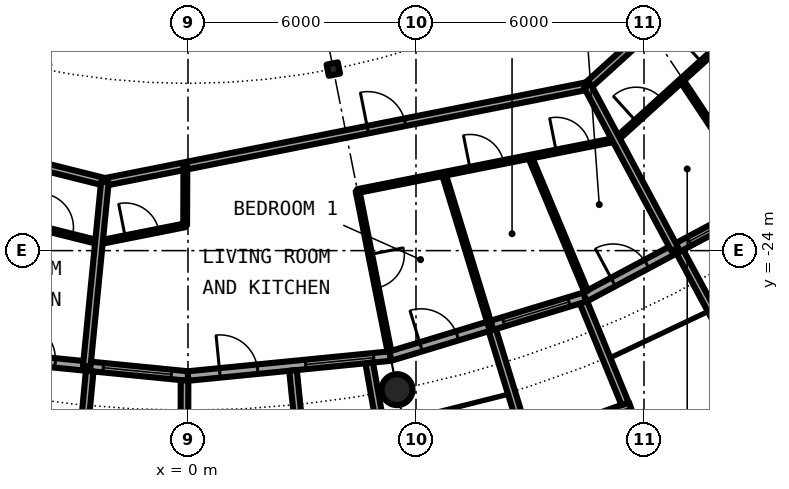
"""IFC4 building model, lengths in metres.
Left out: names, types, materials, properties, quantities, classifications, styles, units other than length and angle.
Written with IfcOpenShell. Run it as: python <this file> out.ifc"""

import sys

from ifc_helpers import new_model, si_unit, direction, frame, frame_2d, origin, origin_2d, place, context, subcontext, project, spatial, rectangle, circle, hollow_circle, i_section, extrude, element, fill, save


model = new_model("IFC4")
c1 = context("Model", 3, precision=1e-05, world=origin(), true_north=direction((0.0, 1.0)))
c2 = subcontext(c1, "Body", "Model", "MODEL_VIEW")
j1 = project(units=[si_unit("LENGTHUNIT", "METRE"), si_unit("PLANEANGLEUNIT", "RADIAN")], contexts=[c1])
p1 = place(None, origin())
s1 = spatial("IfcSite", under=j1, at=p1, CompositionType="ELEMENT")
p2 = place(p1, origin())
s2 = spatial("IfcBuilding", under=s1, at=p2, CompositionType="ELEMENT")
p3 = place(p2, frame((0.0, 0.0, 227.95)))
s3 = spatial("IfcBuildingStorey", under=s2, at=p3, CompositionType="ELEMENT", Elevation=227.95)
p4 = place(p3, frame((5.501, -27.658, 0.0), z_axis=(0.0, 0.0, 1.0), x_axis=(1.0, 0.0, 0.0)))
e1 = element("IfcColumn", 1, at=p4, inside=s3, PredefinedType="COLUMN", context=c2, shape_type="SweptSolid", body=[
    extrude(hollow_circle(Radius=0.406, WallThickness=0.03, at=origin_2d()), origin(), (0.0, 0.0, 1.0), 3.05),
])
p5 = place(p3, frame((3.824, -19.223, 0.0), z_axis=(0.0, 0.0, 1.0), x_axis=(0.195090322016, -0.980785280403, 0.0)))
e2 = element("IfcColumn", 2, at=p5, inside=s3, PredefinedType="COLUMN", context=c2, shape_type="SweptSolid", body=[
    extrude(i_section(OverallWidth=0.3, OverallDepth=0.3, WebThickness=0.011, FlangeThickness=0.019, FilletRadius=0.027, at=origin_2d()), origin(), (0.0, 0.0, 1.0), 3.05),
])
p6 = place(p3, frame((-5.326, -26.775, 0.0), z_axis=(0.0, 0.0, 1.0), x_axis=(0.995173996315, -0.098126026407, 0.0)))
e3 = element("IfcWall", 3, at=p6, inside=s3, PredefinedType="SOLIDWALL", context=c2, shape_type="SweptSolid", body=[
    extrude(rectangle(XDim=5.352, YDim=0.25, at=frame_2d((2.676, 0.0))), origin(), (0.0, 0.0, 1.0), 2.7),
])
p7 = place(p6, frame((0.841, 0.0, 0.0)))
e4 = element("IfcOpeningElement", 4, at=p7, cuts=e3, PredefinedType="OPENING", context=c2, shape_type="SweptSolid", body=[
    extrude(rectangle(XDim=1.0, YDim=2.2, at=frame_2d((0.5, 1.1))), frame((0.0, 0.135, 0.0), z_axis=(0.0, -1.0, 0.0), x_axis=(1.0, 0.0, 0.0)), (0.0, 0.0, 1.0), 0.27),
])
p8 = place(p6, frame((3.111, 0.0, 0.3)))
e5 = element("IfcOpeningElement", 5, at=p8, cuts=e3, PredefinedType="OPENING", context=c2, shape_type="SweptSolid", body=[
    extrude(rectangle(XDim=1.8, YDim=2.1, at=frame_2d((0.9, 1.05))), frame((0.0, 0.135, 0.0), z_axis=(0.0, -1.0, 0.0), x_axis=(1.0, 0.0, 0.0)), (0.0, 0.0, 1.0), 0.27),
])
p9 = place(p3, frame((-2.586, -27.171, -0.03), z_axis=(0.0, 0.0, 1.0), x_axis=(-0.094548432284, -0.995520262954, 0.0)))
e6 = element("IfcWall", 6, at=p9, inside=s3, PredefinedType="SOLIDWALL", context=c2, shape_type="SweptSolid", body=[
    extrude(rectangle(XDim=3.006, YDim=0.2, at=frame_2d((1.503, 0.0))), origin(), (0.0, 0.0, 1.0), 2.73),
])
p10 = place(p3, frame((-0.09, -27.417, -0.03), z_axis=(0.0, 0.0, 1.0), x_axis=(-0.00347308367, -0.999993968827, 0.0)))
e7 = element("IfcWall", 7, at=p10, inside=s3, PredefinedType="SOLIDWALL", context=c2, shape_type="SweptSolid", body=[
    extrude(rectangle(XDim=2.882, YDim=0.2, at=frame_2d((1.441, 0.0))), origin(), (0.0, 0.0, 1.0), 2.73),
])
p11 = place(p3, frame((0.0, -27.3, 0.0), z_axis=(0.0, 0.0, 1.0), x_axis=(0.995173996315, 0.098126026407, 0.0)))
e8 = element("IfcWall", 8, at=p11, inside=s3, PredefinedType="SOLIDWALL", context=c2, shape_type="SweptSolid", body=[
    extrude(rectangle(XDim=5.352, YDim=0.25, at=frame_2d((2.676, 0.0))), origin(), (0.0, 0.0, 1.0), 2.7),
])
p12 = place(p11, frame((0.841, 0.0, 0.0)))
e9 = element("IfcOpeningElement", 9, at=p12, cuts=e8, PredefinedType="OPENING", context=c2, shape_type="SweptSolid", body=[
    extrude(rectangle(XDim=1.0, YDim=2.2, at=frame_2d((0.5, 1.1))), frame((0.0, 0.135, 0.0), z_axis=(0.0, -1.0, 0.0), x_axis=(1.0, 0.0, 0.0)), (0.0, 0.0, 1.0), 0.27),
])
p13 = place(p11, frame((3.111, 0.0, 0.3)))
e10 = element("IfcOpeningElement", 10, at=p13, cuts=e8, PredefinedType="OPENING", context=c2, shape_type="SweptSolid", body=[
    extrude(rectangle(XDim=1.8, YDim=2.1, at=frame_2d((0.9, 1.05))), frame((0.0, 0.135, 0.0), z_axis=(0.0, -1.0, 0.0), x_axis=(1.0, 0.0, 0.0)), (0.0, 0.0, 1.0), 0.27),
])
p14 = place(p3, frame((2.764, -27.153, -0.03), z_axis=(0.0, 0.0, 1.0), x_axis=(0.101505487237, -0.994834979311, 0.0)))
e11 = element("IfcWall", 11, at=p14, inside=s3, PredefinedType="SOLIDWALL", context=c2, shape_type="SweptSolid", body=[
    extrude(rectangle(XDim=3.007, YDim=0.2, at=frame_2d((1.503, 0.0))), origin(), (0.0, 0.0, 1.0), 2.73),
])
p15 = place(p3, frame((4.769, -26.956, -0.03), z_axis=(0.0, 0.0, 1.0), x_axis=(0.174056778901, -0.984735618183, 0.0)))
e12 = element("IfcWall", 12, at=p15, inside=s3, PredefinedType="SOLIDWALL", context=c2, shape_type="SweptSolid", body=[
    extrude(rectangle(XDim=2.925, YDim=0.2, at=frame_2d((1.462, 0.0))), origin(), (0.0, 0.0, 1.0), 2.73),
])
p16 = place(p3, frame((5.326, -26.775, 0.0), z_axis=(0.0, 0.0, 1.0), x_axis=(0.956965678721, 0.290201119486, 0.0)))
e13 = element("IfcWall", 13, at=p16, inside=s3, PredefinedType="SOLIDWALL", context=c2, shape_type="SweptSolid", body=[
    extrude(rectangle(XDim=5.351, YDim=0.25, at=frame_2d((2.676, 0.0))), origin(), (0.0, 0.0, 1.0), 2.7),
])
p17 = place(p16, frame((0.841, 0.0, 0.0)))
e14 = element("IfcOpeningElement", 14, at=p17, cuts=e13, PredefinedType="OPENING", context=c2, shape_type="SweptSolid", body=[
    extrude(rectangle(XDim=1.0, YDim=2.2, at=frame_2d((0.5, 1.1))), frame((0.0, 0.135, 0.0), z_axis=(0.0, -1.0, 0.0), x_axis=(1.0, 0.0, 0.0)), (0.0, 0.0, 1.0), 0.27),
])
p18 = place(p16, frame((3.111, 0.0, 0.3)))
e15 = element("IfcOpeningElement", 15, at=p18, cuts=e13, PredefinedType="OPENING", context=c2, shape_type="SweptSolid", body=[
    extrude(rectangle(XDim=1.8, YDim=2.1, at=frame_2d((0.9, 1.05))), frame((0.0, 0.135, 0.0), z_axis=(0.0, -1.0, 0.0), x_axis=(1.0, 0.0, 0.0)), (0.0, 0.0, 1.0), 0.27),
])
p19 = place(p3, frame((8.82, -29.093, -0.03), z_axis=(0.0, 0.0, 1.0), x_axis=(0.941461077774, 0.337121697664, 0.0)))
e16 = element("IfcWall", 16, at=p19, inside=s3, PredefinedType="SOLIDWALL", context=c2, shape_type="SweptSolid", body=[
    extrude(rectangle(XDim=2.993, YDim=0.2, at=frame_2d((1.497, 0.0))), origin(), (0.0, 0.0, 1.0), 2.73),
])
p20 = place(p19, frame((0.457, 0.0, 0.33)))
e17 = element("IfcOpeningElement", 17, at=p20, cuts=e16, PredefinedType="OPENING", context=c2, shape_type="SweptSolid", body=[
    extrude(circle(Radius=1.04, at=frame_2d((1.04, 1.04))), frame((0.0, 0.11, 0.0), z_axis=(0.0, -1.0, 0.0), x_axis=(1.0, 0.0, 0.0)), (0.0, 0.0, 1.0), 0.22),
])
p21 = place(p3, frame((8.009, -26.092, -0.03), z_axis=(0.0, 0.0, 1.0), x_axis=(0.293406695073, -0.955987715029, 0.0)))
e18 = element("IfcWall", 18, at=p21, inside=s3, PredefinedType="SOLIDWALL", context=c2, shape_type="SweptSolid", body=[
    extrude(rectangle(XDim=3.006, YDim=0.2, at=frame_2d((1.503, 0.0))), origin(), (0.0, 0.0, 1.0), 2.73),
])
p22 = place(p3, frame((10.409, -25.364, -0.03), z_axis=(0.0, 0.0, 1.0), x_axis=(0.379509886562, -0.925187681501, 0.0)))
e19 = element("IfcWall", 19, at=p22, inside=s3, PredefinedType="SOLIDWALL", context=c2, shape_type="SweptSolid", body=[
    extrude(rectangle(XDim=2.883, YDim=0.2, at=frame_2d((1.441, 0.0))), origin(), (0.0, 0.0, 1.0), 2.73),
])
p23 = place(p3, frame((10.447, -25.222, 0.0), z_axis=(0.0, 0.0, 1.0), x_axis=(0.881915646801, 0.471407246368, 0.0)))
e20 = element("IfcWall", 20, at=p23, inside=s3, PredefinedType="SOLIDWALL", context=c2, shape_type="SweptSolid", body=[
    extrude(rectangle(XDim=5.352, YDim=0.25, at=frame_2d((2.676, 0.0))), origin(), (0.0, 0.0, 1.0), 2.7),
])
p24 = place(p23, frame((0.841, 0.0, 0.0)))
e21 = element("IfcOpeningElement", 21, at=p24, cuts=e20, PredefinedType="OPENING", context=c2, shape_type="SweptSolid", body=[
    extrude(rectangle(XDim=1.0, YDim=2.2, at=frame_2d((0.5, 1.1))), frame((0.0, 0.135, 0.0), z_axis=(0.0, -1.0, 0.0), x_axis=(1.0, 0.0, 0.0)), (0.0, 0.0, 1.0), 0.27),
])
p25 = place(p23, frame((3.111, 0.0, 0.3)))
e22 = element("IfcOpeningElement", 22, at=p25, cuts=e20, PredefinedType="OPENING", context=c2, shape_type="SweptSolid", body=[
    extrude(rectangle(XDim=1.8, YDim=2.1, at=frame_2d((0.9, 1.05))), frame((0.0, 0.135, 0.0), z_axis=(0.0, -1.0, 0.0), x_axis=(1.0, 0.0, 0.0)), (0.0, 0.0, 1.0), 0.27),
])
p26 = place(p3, frame((12.945, -24.029, -0.03), z_axis=(0.0, 0.0, 1.0), x_axis=(0.474424310775, -0.88029629861, 0.0)))
e23 = element("IfcWall", 23, at=p26, inside=s3, PredefinedType="SOLIDWALL", context=c2, shape_type="SweptSolid", body=[
    extrude(rectangle(XDim=3.006, YDim=0.2, at=frame_2d((1.503, 0.0))), origin(), (0.0, 0.0, 1.0), 2.73),
])
p27 = place(p3, frame((-4.608, -23.218, 0.0), z_axis=(0.0, 0.0, 1.0), x_axis=(0.970124059177, -0.242609376996, 0.0)))
e24 = element("IfcWall", 24, at=p27, inside=s3, PredefinedType="PARTITIONING", context=c2, shape_type="SweptSolid", body=[
    extrude(rectangle(XDim=2.337, YDim=0.1, at=frame_2d((1.168, 0.0))), origin(), (0.0, 0.0, 1.0), 2.7),
])
p28 = place(p27, frame((0.716, 0.0, 0.0)))
e25 = element("IfcOpeningElement", 25, at=p28, cuts=e24, PredefinedType="OPENING", context=c2, shape_type="SweptSolid", body=[
    extrude(rectangle(XDim=0.9, YDim=2.3, at=frame_2d((0.45, 1.15))), frame((0.0, 0.06, 0.0), z_axis=(0.0, -1.0, 0.0), x_axis=(1.0, 0.0, 0.0)), (0.0, 0.0, 1.0), 0.12),
])
p29 = place(p3, frame((11.266, -21.078, 0.0), z_axis=(0.0, 0.0, 1.0), x_axis=(0.74114118713, 0.671349194339, 0.0)))
e26 = element("IfcWall", 26, at=p29, inside=s3, PredefinedType="PARTITIONING", context=c2, shape_type="SweptSolid", body=[
    extrude(rectangle(XDim=6.965, YDim=0.1, at=frame_2d((3.482, 0.0))), origin(), (0.0, 0.0, 1.0), 2.7),
])
p30 = place(p29, frame((3.034, 0.0, 0.0)))
e27 = element("IfcOpeningElement", 27, at=p30, cuts=e26, PredefinedType="OPENING", context=c2, shape_type="SweptSolid", body=[
    extrude(rectangle(XDim=0.9, YDim=2.3, at=frame_2d((0.45, 1.15))), frame((0.0, 0.06, 0.0), z_axis=(0.0, -1.0, 0.0), x_axis=(1.0, 0.0, 0.0)), (0.0, 0.0, 1.0), 0.12),
])
p31 = place(p29, frame((0.712, 0.0, 0.0)))
e28 = element("IfcOpeningElement", 28, at=p31, cuts=e26, PredefinedType="OPENING", context=c2, shape_type="SweptSolid", body=[
    extrude(rectangle(XDim=0.9, YDim=2.3, at=frame_2d((0.45, 1.15))), frame((0.0, 0.06, 0.0), z_axis=(0.0, -1.0, 0.0), x_axis=(1.0, 0.0, 0.0)), (0.0, 0.0, 1.0), 0.12),
])
p32 = place(p3, frame((-2.343, -23.785, 0.0), z_axis=(0.0, 0.0, 1.0), x_axis=(0.98081942231, 0.194918600496, 0.0)))
e29 = element("IfcWall", 29, at=p32, inside=s3, PredefinedType="PARTITIONING", context=c2, shape_type="SweptSolid", body=[
    extrude(rectangle(XDim=2.313, YDim=0.1, at=frame_2d((1.157, 0.0))), origin(), (0.0, 0.0, 1.0), 2.7),
])
p33 = place(p32, frame((0.707, 0.0, 0.0)))
e30 = element("IfcOpeningElement", 30, at=p33, cuts=e29, PredefinedType="OPENING", context=c2, shape_type="SweptSolid", body=[
    extrude(rectangle(XDim=0.9, YDim=2.3, at=frame_2d((0.45, 1.15))), frame((0.0, 0.06, 0.0), z_axis=(0.0, -1.0, 0.0), x_axis=(1.0, 0.0, 0.0)), (0.0, 0.0, 1.0), 0.12),
])
p34 = place(p3, frame((4.46, -22.433, 0.0), z_axis=(0.0, 0.0, 1.0), x_axis=(0.980795304313, 0.195039921651, 0.0)))
e31 = element("IfcWall", 31, at=p34, inside=s3, PredefinedType="PARTITIONING", context=c2, shape_type="SweptSolid", body=[
    extrude(rectangle(XDim=6.937, YDim=0.1, at=frame_2d((3.469, 0.0))), origin(), (0.0, 0.0, 1.0), 2.7),
])
p35 = place(p34, frame((3.021, 0.0, 0.0)))
e32 = element("IfcOpeningElement", 32, at=p35, cuts=e31, PredefinedType="OPENING", context=c2, shape_type="SweptSolid", body=[
    extrude(rectangle(XDim=0.9, YDim=2.3, at=frame_2d((0.45, 1.15))), frame((0.0, 0.06, 0.0), z_axis=(0.0, -1.0, 0.0), x_axis=(1.0, 0.0, 0.0)), (0.0, 0.0, 1.0), 0.12),
])
p36 = place(p34, frame((5.334, 0.0, 0.0)))
e33 = element("IfcOpeningElement", 33, at=p36, cuts=e31, PredefinedType="OPENING", context=c2, shape_type="SweptSolid", body=[
    extrude(rectangle(XDim=0.9, YDim=2.3, at=frame_2d((0.45, 1.15))), frame((0.0, 0.06, 0.0), z_axis=(0.0, -1.0, 0.0), x_axis=(1.0, 0.0, 0.0)), (0.0, 0.0, 1.0), 0.12),
])
p37 = place(p3, frame((-8.534, -20.603, 0.0), z_axis=(0.0, 0.0, 1.0), x_axis=(0.97003047456, -0.242983288366, 0.0)))
e34 = element("IfcWall", 34, at=p37, inside=s3, PredefinedType="PARTITIONING", context=c2, shape_type="SweptSolid", body=[
    extrude(rectangle(XDim=6.544, YDim=0.2, at=frame_2d((3.272, 0.0))), origin(), (0.0, 0.0, 1.0), 2.7),
])
p38 = place(p37, frame((1.681, 0.0, 0.0)))
e35 = element("IfcOpeningElement", 35, at=p38, cuts=e34, PredefinedType="OPENING", context=c2, shape_type="SweptSolid", body=[
    extrude(rectangle(XDim=1.0, YDim=2.3, at=frame_2d((0.5, 1.15))), frame((0.0, 0.11, 0.0), z_axis=(0.0, -1.0, 0.0), x_axis=(1.0, 0.0, 0.0)), (0.0, 0.0, 1.0), 0.22),
])
p39 = place(p3, frame((10.512, -19.667, 0.0), z_axis=(0.0, 0.0, 1.0), x_axis=(0.740947367223, 0.671563101283, 0.0)))
e36 = element("IfcWall", 36, at=p39, inside=s3, PredefinedType="PARTITIONING", context=c2, shape_type="SweptSolid", body=[
    extrude(rectangle(XDim=10.837, YDim=0.2, at=frame_2d((5.419, 0.0))), origin(), (0.0, 0.0, 1.0), 2.7),
])
p40 = place(p39, frame((3.835, 0.0, 0.0)))
e37 = element("IfcOpeningElement", 37, at=p40, cuts=e36, PredefinedType="OPENING", context=c2, shape_type="SweptSolid", body=[
    extrude(rectangle(XDim=1.0, YDim=2.3, at=frame_2d((0.5, 1.15))), frame((0.0, 0.11, 0.0), z_axis=(0.0, -1.0, 0.0), x_axis=(1.0, 0.0, 0.0)), (0.0, 0.0, 1.0), 0.22),
])
p41 = place(p3, frame((-2.186, -22.193, 0.0), z_axis=(0.0, 0.0, 1.0), x_axis=(0.980780341017, 0.195115152343, 0.0)))
e38 = element("IfcWall", 38, at=p41, inside=s3, PredefinedType="PARTITIONING", context=c2, shape_type="SweptSolid", body=[
    extrude(rectangle(XDim=12.947, YDim=0.2, at=frame_2d((6.473, 0.0))), origin(), (0.0, 0.0, 1.0), 2.7),
])
p42 = place(p41, frame((7.053, 0.0, 0.0)))
e39 = element("IfcOpeningElement", 39, at=p42, cuts=e38, PredefinedType="OPENING", context=c2, shape_type="SweptSolid", body=[
    extrude(rectangle(XDim=1.0, YDim=2.3, at=frame_2d((0.5, 1.15))), frame((0.0, 0.11, 0.0), z_axis=(0.0, -1.0, 0.0), x_axis=(1.0, 0.0, 0.0)), (0.0, 0.0, 1.0), 0.22),
])
p43 = place(p3, frame((-2.664, -27.044, 0.0), z_axis=(0.0, 0.0, 1.0), x_axis=(0.098070432075, 0.995179476453, 0.0)))
e40 = element("IfcWall", 40, at=p43, inside=s3, PredefinedType="PARTITIONING", context=c2, shape_type="SweptSolid", body=[
    extrude(rectangle(XDim=4.874, YDim=0.2, at=frame_2d((2.437, 0.0))), origin(), (0.0, 0.0, 1.0), 2.7),
])
p44 = place(p3, frame((-0.074, -23.334, 0.0), z_axis=(0.0, 0.0, 1.0), x_axis=(0.003125961595, 0.99999511417, 0.0)))
e41 = element("IfcWall", 41, at=p44, inside=s3, PredefinedType="PARTITIONING", context=c2, shape_type="SweptSolid", body=[
    extrude(rectangle(XDim=1.562, YDim=0.1, at=frame_2d((0.781, 0.0))), origin(), (0.0, 0.0, 1.0), 2.7),
])
p45 = place(p3, frame((4.462, -22.431, 0.0), z_axis=(0.0, 0.0, 1.0), x_axis=(0.195145394338, -0.98077432423, 0.0)))
e42 = element("IfcWall", 42, at=p45, inside=s3, PredefinedType="PARTITIONING", context=c2, shape_type="SweptSolid", body=[
    extrude(rectangle(XDim=4.305, YDim=0.1, at=frame_2d((2.152, 0.0))), origin(), (0.0, 0.0, 1.0), 2.7),
])
p46 = place(p45, frame((1.702, 0.0, 0.0)))
e43 = element("IfcOpeningElement", 43, at=p46, cuts=e42, PredefinedType="OPENING", context=c2, shape_type="SweptSolid", body=[
    extrude(rectangle(XDim=0.9, YDim=2.3, at=frame_2d((0.45, 1.15))), frame((0.0, 0.06, 0.0), z_axis=(0.0, -1.0, 0.0), x_axis=(1.0, 0.0, 0.0)), (0.0, 0.0, 1.0), 0.12),
])
p47 = place(p3, frame((6.73, -21.98, 0.0), z_axis=(0.0, 0.0, 1.0), x_axis=(0.292799128207, -0.956173975028, 0.0)))
e44 = element("IfcWall", 44, at=p47, inside=s3, PredefinedType="PARTITIONING", context=c2, shape_type="SweptSolid", body=[
    extrude(rectangle(XDim=4.188, YDim=0.1, at=frame_2d((2.094, 0.0))), origin(), (0.0, 0.0, 1.0), 2.7),
])
p48 = place(p3, frame((8.998, -21.529, 0.0), z_axis=(0.0, 0.0, 1.0), x_axis=(0.385572005139, -0.922677749192, 0.0)))
e45 = element("IfcWall", 45, at=p48, inside=s3, PredefinedType="PARTITIONING", context=c2, shape_type="SweptSolid", body=[
    extrude(rectangle(XDim=3.841, YDim=0.1, at=frame_2d((1.92, 0.0))), origin(), (0.0, 0.0, 1.0), 2.7),
])
p49 = place(p3, frame((10.512, -19.667, 0.0), z_axis=(0.0, 0.0, 1.0), x_axis=(0.471427642527, -0.881904744211, 0.0)))
e46 = element("IfcWall", 46, at=p49, inside=s3, PredefinedType="PARTITIONING", context=c2, shape_type="SweptSolid", body=[
    extrude(rectangle(XDim=4.875, YDim=0.2, at=frame_2d((2.438, 0.0))), origin(), (0.0, 0.0, 1.0), 2.7),
])
p50 = place(p3, frame((12.988, -19.518, 0.0), z_axis=(0.0, 0.0, 1.0), x_axis=(0.553823887887, -0.83263383381, 0.0)))
e47 = element("IfcWall", 47, at=p50, inside=s3, PredefinedType="PARTITIONING", context=c2, shape_type="SweptSolid", body=[
    extrude(rectangle(XDim=3.73, YDim=0.1, at=frame_2d((1.865, 0.0))), origin(), (0.0, 0.0, 1.0), 2.7),
])
p51 = place(p7, origin())
e48 = element("IfcDoor", 48, at=p51, inside=s3, OperationType="SINGLE_SWING_LEFT", PredefinedType="DOOR", context=c2, shape_type="SweptSolid", body=[
    extrude(rectangle(XDim=1.0, YDim=2.2, at=frame_2d((0.5, 1.1))), frame((0.0, 0.025, 0.0), z_axis=(0.0, -1.0, 0.0), x_axis=(1.0, 0.0, 0.0)), (0.0, 0.0, 1.0), 0.05),
])
fill(e4, e48)
p52 = place(p8, origin())
e49 = element("IfcWindow", 49, at=p52, inside=s3, PartitioningType="SINGLE_PANEL", PredefinedType="WINDOW", context=c2, shape_type="SweptSolid", body=[
    extrude(rectangle(XDim=1.8, YDim=2.1, at=frame_2d((0.9, 1.05))), frame((0.0, 0.03, 0.0), z_axis=(0.0, -1.0, 0.0), x_axis=(1.0, 0.0, 0.0)), (0.0, 0.0, 1.0), 0.06),
])
fill(e5, e49)
p53 = place(p12, origin())
e50 = element("IfcDoor", 50, at=p53, inside=s3, OperationType="SINGLE_SWING_LEFT", PredefinedType="DOOR", context=c2, shape_type="SweptSolid", body=[
    extrude(rectangle(XDim=1.0, YDim=2.2, at=frame_2d((0.5, 1.1))), frame((0.0, 0.025, 0.0), z_axis=(0.0, -1.0, 0.0), x_axis=(1.0, 0.0, 0.0)), (0.0, 0.0, 1.0), 0.05),
])
fill(e9, e50)
p54 = place(p13, origin())
e51 = element("IfcWindow", 51, at=p54, inside=s3, PartitioningType="SINGLE_PANEL", PredefinedType="WINDOW", context=c2, shape_type="SweptSolid", body=[
    extrude(rectangle(XDim=1.8, YDim=2.1, at=frame_2d((0.9, 1.05))), frame((0.0, 0.03, 0.0), z_axis=(0.0, -1.0, 0.0), x_axis=(1.0, 0.0, 0.0)), (0.0, 0.0, 1.0), 0.06),
])
fill(e10, e51)
p55 = place(p17, origin())
e52 = element("IfcDoor", 52, at=p55, inside=s3, OperationType="SINGLE_SWING_LEFT", PredefinedType="DOOR", context=c2, shape_type="SweptSolid", body=[
    extrude(rectangle(XDim=1.0, YDim=2.2, at=frame_2d((0.5, 1.1))), frame((0.0, 0.025, 0.0), z_axis=(0.0, -1.0, 0.0), x_axis=(1.0, 0.0, 0.0)), (0.0, 0.0, 1.0), 0.05),
])
fill(e14, e52)
p56 = place(p18, origin())
e53 = element("IfcWindow", 53, at=p56, inside=s3, PartitioningType="SINGLE_PANEL", PredefinedType="WINDOW", context=c2, shape_type="SweptSolid", body=[
    extrude(rectangle(XDim=1.8, YDim=2.1, at=frame_2d((0.9, 1.05))), frame((0.0, 0.03, 0.0), z_axis=(0.0, -1.0, 0.0), x_axis=(1.0, 0.0, 0.0)), (0.0, 0.0, 1.0), 0.06),
])
fill(e15, e53)
p57 = place(p24, origin())
e54 = element("IfcDoor", 54, at=p57, inside=s3, OperationType="SINGLE_SWING_LEFT", PredefinedType="DOOR", context=c2, shape_type="SweptSolid", body=[
    extrude(rectangle(XDim=1.0, YDim=2.2, at=frame_2d((0.5, 1.1))), frame((0.0, 0.025, 0.0), z_axis=(0.0, -1.0, 0.0), x_axis=(1.0, 0.0, 0.0)), (0.0, 0.0, 1.0), 0.05),
])
fill(e21, e54)
p58 = place(p25, origin())
e55 = element("IfcWindow", 55, at=p58, inside=s3, PartitioningType="SINGLE_PANEL", PredefinedType="WINDOW", context=c2, shape_type="SweptSolid", body=[
    extrude(rectangle(XDim=1.8, YDim=2.1, at=frame_2d((0.9, 1.05))), frame((0.0, 0.03, 0.0), z_axis=(0.0, -1.0, 0.0), x_axis=(1.0, 0.0, 0.0)), (0.0, 0.0, 1.0), 0.06),
])
fill(e22, e55)
p59 = place(p28, origin())
e56 = element("IfcDoor", 56, at=p59, inside=s3, OperationType="SINGLE_SWING_LEFT", PredefinedType="DOOR", context=c2, shape_type="SweptSolid", body=[
    extrude(rectangle(XDim=0.9, YDim=2.3, at=frame_2d((0.45, 1.15))), frame((0.0, 0.025, 0.0), z_axis=(0.0, -1.0, 0.0), x_axis=(1.0, 0.0, 0.0)), (0.0, 0.0, 1.0), 0.05),
])
fill(e25, e56)
p60 = place(p42, origin())
e57 = element("IfcDoor", 57, at=p60, inside=s3, OperationType="SINGLE_SWING_RIGHT", PredefinedType="DOOR", context=c2, shape_type="SweptSolid", body=[
    extrude(rectangle(XDim=1.0, YDim=2.3, at=frame_2d((0.5, 1.15))), frame((0.0, 0.025, 0.0), z_axis=(0.0, -1.0, 0.0), x_axis=(1.0, 0.0, 0.0)), (0.0, 0.0, 1.0), 0.05),
])
fill(e39, e57)
p61 = place(p33, origin())
e58 = element("IfcDoor", 58, at=p61, inside=s3, OperationType="SINGLE_SWING_LEFT", PredefinedType="DOOR", context=c2, shape_type="SweptSolid", body=[
    extrude(rectangle(XDim=0.9, YDim=2.3, at=frame_2d((0.45, 1.15))), frame((0.0, 0.025, 0.0), z_axis=(0.0, -1.0, 0.0), x_axis=(1.0, 0.0, 0.0)), (0.0, 0.0, 1.0), 0.05),
])
fill(e30, e58)
p62 = place(p46, origin())
e59 = element("IfcDoor", 59, at=p62, inside=s3, OperationType="SINGLE_SWING_RIGHT", PredefinedType="DOOR", context=c2, shape_type="SweptSolid", body=[
    extrude(rectangle(XDim=0.9, YDim=2.3, at=frame_2d((0.45, 1.15))), frame((0.0, 0.025, 0.0), z_axis=(0.0, -1.0, 0.0), x_axis=(1.0, 0.0, 0.0)), (0.0, 0.0, 1.0), 0.05),
])
fill(e43, e59)
p63 = place(p35, origin())
e60 = element("IfcDoor", 60, at=p63, inside=s3, OperationType="SINGLE_SWING_RIGHT", PredefinedType="DOOR", context=c2, shape_type="SweptSolid", body=[
    extrude(rectangle(XDim=0.9, YDim=2.3, at=frame_2d((0.45, 1.15))), frame((0.0, 0.025, 0.0), z_axis=(0.0, -1.0, 0.0), x_axis=(1.0, 0.0, 0.0)), (0.0, 0.0, 1.0), 0.05),
])
fill(e32, e60)
p64 = place(p36, origin())
e61 = element("IfcDoor", 61, at=p64, inside=s3, OperationType="SINGLE_SWING_RIGHT", PredefinedType="DOOR", context=c2, shape_type="SweptSolid", body=[
    extrude(rectangle(XDim=0.9, YDim=2.3, at=frame_2d((0.45, 1.15))), frame((0.0, 0.025, 0.0), z_axis=(0.0, -1.0, 0.0), x_axis=(1.0, 0.0, 0.0)), (0.0, 0.0, 1.0), 0.05),
])
fill(e33, e61)
p65 = place(p30, origin())
e62 = element("IfcDoor", 62, at=p65, inside=s3, OperationType="SINGLE_SWING_RIGHT", PredefinedType="DOOR", context=c2, shape_type="SweptSolid", body=[
    extrude(rectangle(XDim=0.9, YDim=2.3, at=frame_2d((0.45, 1.15))), frame((0.0, 0.025, 0.0), z_axis=(0.0, -1.0, 0.0), x_axis=(1.0, 0.0, 0.0)), (0.0, 0.0, 1.0), 0.05),
])
fill(e27, e62)
p66 = place(p31, origin())
e63 = element("IfcDoor", 63, at=p66, inside=s3, OperationType="SINGLE_SWING_LEFT", PredefinedType="DOOR", context=c2, shape_type="SweptSolid", body=[
    extrude(rectangle(XDim=0.9, YDim=2.3, at=frame_2d((0.45, 1.15))), frame((0.0, 0.025, 0.0), z_axis=(0.0, -1.0, 0.0), x_axis=(1.0, 0.0, 0.0)), (0.0, 0.0, 1.0), 0.05),
])
fill(e28, e63)
save(model, sys.argv[1])
